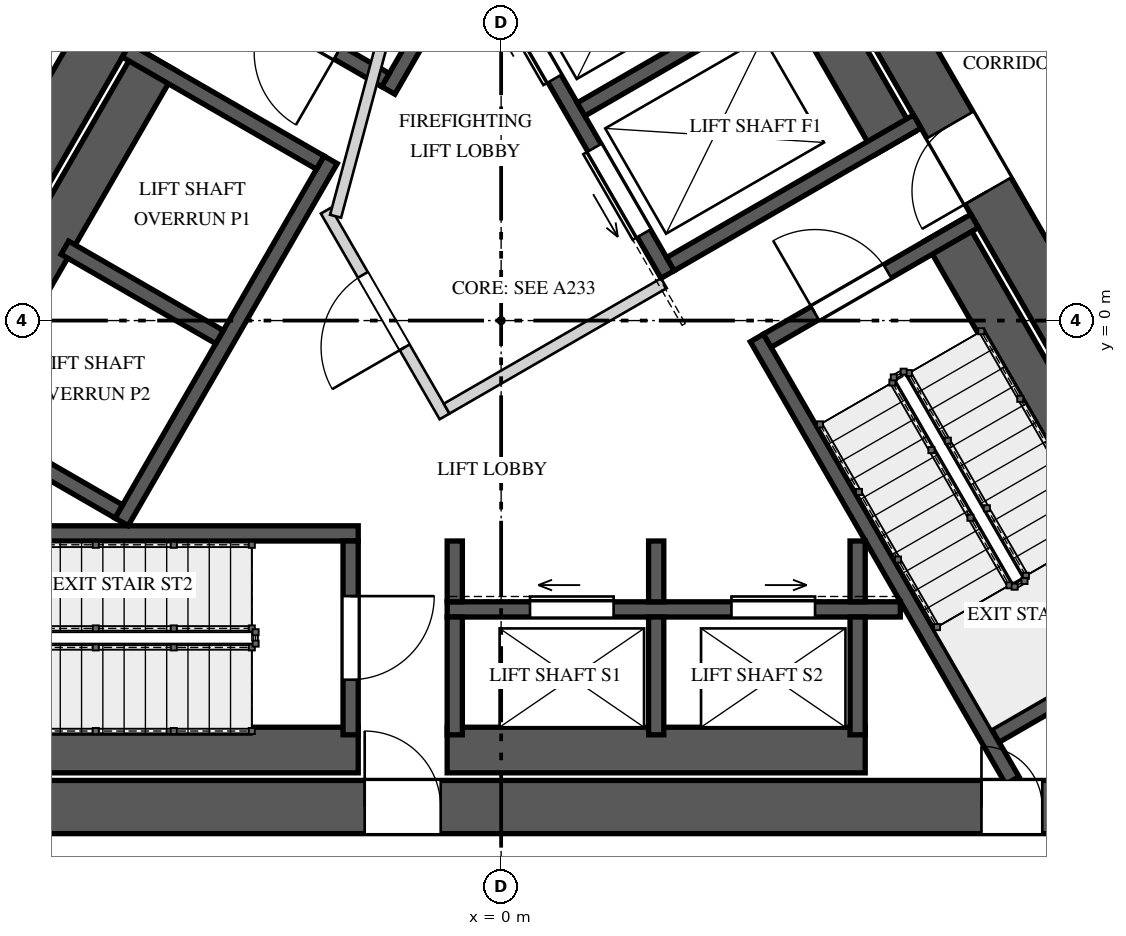
"""IFC4 building model, lengths in metres.
Left out: names, types, materials, properties, quantities, classifications, styles, units other than length and angle.
Written with IfcOpenShell. Run it as: python <this file> out.ifc"""

import sys

from ifc_helpers import new_model, si_unit, direction, frame, frame_2d, origin, place, context, subcontext, project, spatial, rectangle, extrude, element, fill, save


model = new_model("IFC4")
c1 = context("Model", 3, precision=1e-05, world=origin(), true_north=direction((0.0, 1.0)))
c2 = subcontext(c1, "Body", "Model", "MODEL_VIEW")
j1 = project(units=[si_unit("LENGTHUNIT", "METRE"), si_unit("PLANEANGLEUNIT", "RADIAN")], contexts=[c1])
p1 = place(None, origin())
s1 = spatial("IfcSite", under=j1, at=p1, CompositionType="ELEMENT")
p2 = place(p1, origin())
s2 = spatial("IfcBuilding", under=s1, at=p2, CompositionType="ELEMENT")
p3 = place(p2, frame((0.0, 0.0, 241.2)))
s3 = spatial("IfcBuildingStorey", under=s2, at=p3, CompositionType="ELEMENT", Elevation=241.2)
p4 = place(p3, frame((-1.241, 10.65, 0.0), z_axis=(0.0, 0.0, 1.0), x_axis=(-0.500003331888, -0.866023480109, 0.0)))
e1 = element("IfcWall", 1, at=p4, inside=s3, PredefinedType="SHEAR", context=c2, shape_type="SweptSolid", body=[
    extrude(rectangle(XDim=17.205, YDim=0.7, at=frame_2d((8.603, 0.0))), origin(), (0.0, 0.0, 1.0), 4.0),
])
p5 = place(p4, frame((6.808, 0.0, 0.0)))
e2 = element("IfcOpeningElement", 2, at=p5, cuts=e1, PredefinedType="OPENING", context=c2, shape_type="SweptSolid", body=[
    extrude(rectangle(XDim=1.0, YDim=2.4, at=frame_2d((0.5, 1.2))), frame((0.0, 0.36, 0.0), z_axis=(0.0, -1.0, 0.0), x_axis=(1.0, 0.0, 0.0)), (0.0, 0.0, 1.0), 0.72),
])
p6 = place(p4, frame((14.922, 0.0, 0.0)))
e3 = element("IfcOpeningElement", 3, at=p6, cuts=e1, PredefinedType="OPENING", context=c2, shape_type="SweptSolid", body=[
    extrude(rectangle(XDim=0.8, YDim=2.1, at=frame_2d((0.4, 1.05))), frame((0.0, 0.36, 0.0), z_axis=(0.0, -1.0, 0.0), x_axis=(1.0, 0.0, 0.0)), (0.0, 0.0, 1.0), 0.72),
])
p7 = place(p3, frame((-8.603, -6.4, 0.0), z_axis=(0.0, 0.0, 1.0), x_axis=(1.0, 0.0, 0.0)))
e4 = element("IfcWall", 4, at=p7, inside=s3, PredefinedType="SHEAR", context=c2, shape_type="SweptSolid", body=[
    extrude(rectangle(XDim=17.205, YDim=0.7, at=frame_2d((8.603, 0.0))), origin(), (0.0, 0.0, 1.0), 4.0),
])
p8 = place(p7, frame((6.808, 0.0, 0.0)))
e5 = element("IfcOpeningElement", 5, at=p8, cuts=e4, PredefinedType="OPENING", context=c2, shape_type="SweptSolid", body=[
    extrude(rectangle(XDim=1.0, YDim=2.4, at=frame_2d((0.5, 1.2))), frame((0.0, 0.36, 0.0), z_axis=(0.0, -1.0, 0.0), x_axis=(1.0, 0.0, 0.0)), (0.0, 0.0, 1.0), 0.72),
])
p9 = place(p7, frame((14.922, 0.0, 0.0)))
e6 = element("IfcOpeningElement", 6, at=p9, cuts=e4, PredefinedType="OPENING", context=c2, shape_type="SweptSolid", body=[
    extrude(rectangle(XDim=0.8, YDim=2.1, at=frame_2d((0.4, 1.05))), frame((0.0, 0.36, 0.0), z_axis=(0.0, -1.0, 0.0), x_axis=(1.0, 0.0, 0.0)), (0.0, 0.0, 1.0), 0.72),
])
p10 = place(p3, frame((9.844, -4.25, 0.0), z_axis=(0.0, 0.0, 1.0), x_axis=(-0.500003331888, 0.866023480109, 0.0)))
e7 = element("IfcWall", 7, at=p10, inside=s3, PredefinedType="SHEAR", context=c2, shape_type="SweptSolid", body=[
    extrude(rectangle(XDim=17.205, YDim=0.7, at=frame_2d((8.603, 0.0))), origin(), (0.0, 0.0, 1.0), 4.0),
])
p11 = place(p10, frame((6.877, 0.0, 0.0)))
e8 = element("IfcOpeningElement", 8, at=p11, cuts=e7, PredefinedType="OPENING", context=c2, shape_type="SweptSolid", body=[
    extrude(rectangle(XDim=1.0, YDim=2.4, at=frame_2d((0.5, 1.2))), frame((0.0, 0.36, 0.0), z_axis=(0.0, -1.0, 0.0), x_axis=(1.0, 0.0, 0.0)), (0.0, 0.0, 1.0), 0.72),
])
p12 = place(p3, frame((1.876, 8.85, 0.0), z_axis=(0.0, 0.0, 1.0), x_axis=(-0.499998042495, -0.866026533947, 0.0)))
e9 = element("IfcWall", 9, at=p12, inside=s3, PredefinedType="SOLIDWALL", context=c2, shape_type="SweptSolid", body=[
    extrude(rectangle(XDim=6.723, YDim=0.2, at=frame_2d((3.361, 0.0))), origin(), (0.0, 0.0, 1.0), 3.65),
])
p13 = place(p3, frame((-1.521, 3.165, 0.0), z_axis=(0.0, 0.0, 1.0), x_axis=(-0.866035871367, 0.499981869177, 0.0)))
e10 = element("IfcWall", 10, at=p13, inside=s3, PredefinedType="SOLIDWALL", context=c2, shape_type="SweptSolid", body=[
    extrude(rectangle(XDim=3.15, YDim=0.2, at=frame_2d((1.575, 0.0))), origin(), (0.0, 0.0, 1.0), 3.65),
])
p14 = place(p13, frame((0.725, 0.0, 0.0)))
e11 = element("IfcOpeningElement", 11, at=p14, cuts=e10, PredefinedType="OPENING", context=c2, shape_type="SweptSolid", body=[
    extrude(rectangle(XDim=1.1, YDim=2.4, at=frame_2d((0.55, 1.2))), frame((0.0, 0.11, 0.0), z_axis=(0.0, -1.0, 0.0), x_axis=(1.0, 0.0, 0.0)), (0.0, 0.0, 1.0), 0.22),
])
p15 = place(p3, frame((-8.08, -5.65, 0.0), z_axis=(0.0, 0.0, 1.0), x_axis=(1.0, 0.0, 0.0)))
e12 = element("IfcWall", 12, at=p15, inside=s3, PredefinedType="SOLIDWALL", context=c2, shape_type="SweptSolid", body=[
    extrude(rectangle(XDim=6.2, YDim=0.6, at=frame_2d((3.1, 0.0))), origin(), (0.0, 0.0, 1.0), 3.65),
])
p16 = place(p3, frame((-8.603, -2.8, 0.0), z_axis=(0.0, 0.0, 1.0), x_axis=(1.0, 0.0, 0.0)))
e13 = element("IfcWall", 13, at=p16, inside=s3, PredefinedType="SOLIDWALL", context=c2, shape_type="SweptSolid", body=[
    extrude(rectangle(XDim=6.723, YDim=0.2, at=frame_2d((3.361, 0.0))), origin(), (0.0, 0.0, 1.0), 3.65),
])
p17 = place(p3, frame((-1.98, -2.9, 0.0), z_axis=(0.0, 0.0, 1.0), x_axis=(0.0, -1.0, 0.0)))
e14 = element("IfcWall", 14, at=p17, inside=s3, PredefinedType="SOLIDWALL", context=c2, shape_type="SweptSolid", body=[
    extrude(rectangle(XDim=2.55, YDim=0.2, at=frame_2d((1.275, 0.0))), origin(), (0.0, 0.0, 1.0), 3.65),
])
p18 = place(p17, frame((0.725, 0.0, 0.0)))
e15 = element("IfcOpeningElement", 15, at=p18, cuts=e14, PredefinedType="OPENING", context=c2, shape_type="SweptSolid", body=[
    extrude(rectangle(XDim=1.1, YDim=2.4, at=frame_2d((0.55, 1.2))), frame((0.0, 0.11, 0.0), z_axis=(0.0, -1.0, 0.0), x_axis=(1.0, 0.0, 0.0)), (0.0, 0.0, 1.0), 0.22),
])
p19 = place(p3, frame((8.933, -4.172, 0.0), z_axis=(0.0, 0.0, 1.0), x_axis=(-0.500026960575, 0.86600983753, 0.0)))
e16 = element("IfcWall", 16, at=p19, inside=s3, PredefinedType="SOLIDWALL", context=c2, shape_type="SweptSolid", body=[
    extrude(rectangle(XDim=6.2, YDim=0.6, at=frame_2d((3.1, 0.0))), origin(), (0.0, 0.0, 1.0), 3.65),
])
p20 = place(p3, frame((6.726, -6.05, 0.0), z_axis=(0.0, 0.0, 1.0), x_axis=(-0.499970804718, 0.866042259032, 0.0)))
e17 = element("IfcWall", 17, at=p20, inside=s3, PredefinedType="SOLIDWALL", context=c2, shape_type="SweptSolid", body=[
    extrude(rectangle(XDim=6.723, YDim=0.2, at=frame_2d((3.361, 0.0))), origin(), (0.0, 0.0, 1.0), 3.65),
])
p21 = place(p3, frame((6.501, -5.461, 0.0), z_axis=(0.0, 0.0, 1.0), x_axis=(0.866035871367, 0.499981869177, 0.0)))
e18 = element("IfcWall", 18, at=p21, inside=s3, PredefinedType="SOLIDWALL", context=c2, shape_type="SweptSolid", body=[
    extrude(rectangle(XDim=3.15, YDim=0.2, at=frame_2d((1.575, 0.0))), origin(), (0.0, 0.0, 1.0), 3.65),
])
p22 = place(p3, frame((3.501, -0.265, 0.0), z_axis=(0.0, 0.0, 1.0), x_axis=(0.866035871367, 0.499981869177, 0.0)))
e19 = element("IfcWall", 19, at=p22, inside=s3, PredefinedType="SOLIDWALL", context=c2, shape_type="SweptSolid", body=[
    extrude(rectangle(XDim=3.15, YDim=0.2, at=frame_2d((1.575, 0.0))), origin(), (0.0, 0.0, 1.0), 3.65),
])
p23 = place(p22, frame((0.725, 0.0, 0.0)))
e20 = element("IfcOpeningElement", 20, at=p23, cuts=e19, PredefinedType="OPENING", context=c2, shape_type="SweptSolid", body=[
    extrude(rectangle(XDim=1.1, YDim=2.4, at=frame_2d((0.55, 1.2))), frame((0.0, 0.11, 0.0), z_axis=(0.0, -1.0, 0.0), x_axis=(1.0, 0.0, 0.0)), (0.0, 0.0, 1.0), 0.22),
])
p24 = place(p3, frame((-2.243, 2.115, 0.0), z_axis=(0.0, 0.0, 1.0), x_axis=(-0.499996545922, -0.866027397988, 0.0)))
e21 = element("IfcWall", 21, at=p24, inside=s3, PredefinedType="SOLIDWALL", context=c2, shape_type="SweptSolid", body=[
    extrude(rectangle(XDim=5.5, YDim=0.2, at=frame_2d((2.75, 0.0))), origin(), (0.0, 0.0, 1.0), 3.65),
])
p25 = place(p3, frame((-4.538, 3.44, 0.0), z_axis=(0.0, 0.0, 1.0), x_axis=(-0.499996545922, -0.866027397988, 0.0)))
e22 = element("IfcWall", 22, at=p25, inside=s3, PredefinedType="SOLIDWALL", context=c2, shape_type="SweptSolid", body=[
    extrude(rectangle(XDim=5.5, YDim=0.6, at=frame_2d((2.75, 0.0))), origin(), (0.0, 0.0, 1.0), 3.65),
])
p26 = place(p3, frame((-2.38, 2.078, 0.0), z_axis=(0.0, 0.0, 1.0), x_axis=(-0.866060182126, 0.499939757307, 0.0)))
e23 = element("IfcWall", 23, at=p26, inside=s3, PredefinedType="SOLIDWALL", context=c2, shape_type="SweptSolid", body=[
    extrude(rectangle(XDim=2.95, YDim=0.2, at=frame_2d((1.475, 0.0))), origin(), (0.0, 0.0, 1.0), 3.65),
])
p27 = place(p3, frame((-3.705, -0.217, 0.0), z_axis=(0.0, 0.0, 1.0), x_axis=(-0.866016039709, 0.500016218704, 0.0)))
e24 = element("IfcWall", 24, at=p27, inside=s3, PredefinedType="SOLIDWALL", context=c2, shape_type="SweptSolid", body=[
    extrude(rectangle(XDim=2.35, YDim=0.2, at=frame_2d((1.175, 0.0))), origin(), (0.0, 0.0, 1.0), 3.65),
])
p28 = place(p3, frame((-5.03, -2.512, 0.0), z_axis=(0.0, 0.0, 1.0), x_axis=(-0.866003658127, 0.500037662692, 0.0)))
e25 = element("IfcWall", 25, at=p28, inside=s3, PredefinedType="SOLIDWALL", context=c2, shape_type="SweptSolid", body=[
    extrude(rectangle(XDim=2.95, YDim=0.2, at=frame_2d((1.475, 0.0))), origin(), (0.0, 0.0, 1.0), 3.65),
])
p29 = place(p3, frame((-0.71, -3.8, 0.0), z_axis=(0.0, 0.0, 1.0), x_axis=(1.0, 0.0, 0.0)))
e26 = element("IfcWall", 26, at=p29, inside=s3, PredefinedType="SOLIDWALL", context=c2, shape_type="SweptSolid", body=[
    extrude(rectangle(XDim=5.961, YDim=0.2, at=frame_2d((2.981, 0.0))), origin(), (0.0, 0.0, 1.0), 3.65),
])
p30 = place(p29, frame((1.09, 0.0, 0.0)))
e27 = element("IfcOpeningElement", 27, at=p30, cuts=e26, PredefinedType="OPENING", context=c2, shape_type="SweptSolid", body=[
    extrude(rectangle(XDim=1.1, YDim=2.1, at=frame_2d((0.55, 1.05))), frame((0.0, 0.11, 0.0), z_axis=(0.0, -1.0, 0.0), x_axis=(1.0, 0.0, 0.0)), (0.0, 0.0, 1.0), 0.22),
])
p31 = place(p29, frame((3.74, 0.0, 0.0)))
e28 = element("IfcOpeningElement", 28, at=p31, cuts=e26, PredefinedType="OPENING", context=c2, shape_type="SweptSolid", body=[
    extrude(rectangle(XDim=1.1, YDim=2.1, at=frame_2d((0.55, 1.05))), frame((0.0, 0.11, 0.0), z_axis=(0.0, -1.0, 0.0), x_axis=(1.0, 0.0, 0.0)), (0.0, 0.0, 1.0), 0.22),
])
p32 = place(p3, frame((-0.71, -5.65, 0.0), z_axis=(0.0, 0.0, 1.0), x_axis=(1.0, 0.0, 0.0)))
e29 = element("IfcWall", 29, at=p32, inside=s3, PredefinedType="SOLIDWALL", context=c2, shape_type="SweptSolid", body=[
    extrude(rectangle(XDim=5.5, YDim=0.6, at=frame_2d((2.75, 0.0))), origin(), (0.0, 0.0, 1.0), 3.65),
])
p33 = place(p3, frame((-0.61, -3.9, 0.0), z_axis=(0.0, 0.0, 1.0), x_axis=(0.0, -1.0, 0.0)))
e30 = element("IfcWall", 30, at=p33, inside=s3, PredefinedType="SOLIDWALL", context=c2, shape_type="SweptSolid", body=[
    extrude(rectangle(XDim=1.55, YDim=0.2, at=frame_2d((0.775, 0.0))), origin(), (0.0, 0.0, 1.0), 3.65),
])
p34 = place(p3, frame((-0.61, -2.9, 0.0), z_axis=(0.0, 0.0, 1.0), x_axis=(0.0, -1.0, 0.0)))
e31 = element("IfcWall", 31, at=p34, inside=s3, PredefinedType="SOLIDWALL", context=c2, shape_type="SweptSolid", body=[
    extrude(rectangle(XDim=0.8, YDim=0.2, at=frame_2d((0.4, 0.0))), origin(), (0.0, 0.0, 1.0), 3.65),
])
p35 = place(p3, frame((2.04, -3.9, 0.0), z_axis=(0.0, 0.0, 1.0), x_axis=(0.0, -1.0, 0.0)))
e32 = element("IfcWall", 32, at=p35, inside=s3, PredefinedType="SOLIDWALL", context=c2, shape_type="SweptSolid", body=[
    extrude(rectangle(XDim=1.55, YDim=0.2, at=frame_2d((0.775, 0.0))), origin(), (0.0, 0.0, 1.0), 3.65),
])
p36 = place(p3, frame((2.04, -2.9, 0.0), z_axis=(0.0, 0.0, 1.0), x_axis=(0.0, -1.0, 0.0)))
e33 = element("IfcWall", 33, at=p36, inside=s3, PredefinedType="SOLIDWALL", context=c2, shape_type="SweptSolid", body=[
    extrude(rectangle(XDim=0.8, YDim=0.2, at=frame_2d((0.4, 0.0))), origin(), (0.0, 0.0, 1.0), 3.65),
])
p37 = place(p3, frame((4.69, -3.9, 0.0), z_axis=(0.0, 0.0, 1.0), x_axis=(0.0, -1.0, 0.0)))
e34 = element("IfcWall", 34, at=p37, inside=s3, PredefinedType="SOLIDWALL", context=c2, shape_type="SweptSolid", body=[
    extrude(rectangle(XDim=1.55, YDim=0.2, at=frame_2d((0.775, 0.0))), origin(), (0.0, 0.0, 1.0), 3.65),
])
p38 = place(p3, frame((4.69, -2.9, 0.0), z_axis=(0.0, 0.0, 1.0), x_axis=(0.0, -1.0, 0.0)))
e35 = element("IfcWall", 35, at=p38, inside=s3, PredefinedType="SOLIDWALL", context=c2, shape_type="SweptSolid", body=[
    extrude(rectangle(XDim=0.8, YDim=0.2, at=frame_2d((0.4, 0.0))), origin(), (0.0, 0.0, 1.0), 3.65),
])
p39 = place(p3, frame((2.19, 0.606, 0.0), z_axis=(0.0, 0.0, 1.0), x_axis=(-0.500002801628, 0.866023786258, 0.0)))
e36 = element("IfcWall", 36, at=p39, inside=s3, PredefinedType="SOLIDWALL", context=c2, shape_type="SweptSolid", body=[
    extrude(rectangle(XDim=4.9, YDim=0.2, at=frame_2d((2.45, 0.0))), origin(), (0.0, 0.0, 1.0), 3.65),
])
p40 = place(p39, frame((0.625, 0.0, 0.0)))
e37 = element("IfcOpeningElement", 37, at=p40, cuts=e36, PredefinedType="OPENING", context=c2, shape_type="SweptSolid", body=[
    extrude(rectangle(XDim=1.3, YDim=2.1, at=frame_2d((0.65, 1.05))), frame((0.0, 0.11, 0.0), z_axis=(0.0, -1.0, 0.0), x_axis=(1.0, 0.0, 0.0)), (0.0, 0.0, 1.0), 0.22),
])
p41 = place(p39, frame((2.975, 0.0, 0.0)))
e38 = element("IfcOpeningElement", 38, at=p41, cuts=e36, PredefinedType="OPENING", context=c2, shape_type="SweptSolid", body=[
    extrude(rectangle(XDim=1.3, YDim=2.1, at=frame_2d((0.65, 1.05))), frame((0.0, 0.11, 0.0), z_axis=(0.0, -1.0, 0.0), x_axis=(1.0, 0.0, 0.0)), (0.0, 0.0, 1.0), 0.22),
])
p42 = place(p3, frame((5.178, 2.331, 0.0), z_axis=(0.0, 0.0, 1.0), x_axis=(-0.49998122708, 0.866036242063, 0.0)))
e39 = element("IfcWall", 39, at=p42, inside=s3, PredefinedType="SOLIDWALL", context=c2, shape_type="SweptSolid", body=[
    extrude(rectangle(XDim=4.9, YDim=0.6, at=frame_2d((2.45, 0.0))), origin(), (0.0, 0.0, 1.0), 3.65),
])
p43 = place(p3, frame((2.227, 0.743, 0.0), z_axis=(0.0, 0.0, 1.0), x_axis=(0.866022959057, 0.500004234368, 0.0)))
e40 = element("IfcWall", 40, at=p43, inside=s3, PredefinedType="SOLIDWALL", context=c2, shape_type="SweptSolid", body=[
    extrude(rectangle(XDim=3.75, YDim=0.2, at=frame_2d((1.875, 0.0))), origin(), (0.0, 0.0, 1.0), 3.65),
])
p44 = place(p3, frame((1.052, 2.778, 0.0), z_axis=(0.0, 0.0, 1.0), x_axis=(0.866039234136, 0.499976044363, 0.0)))
e41 = element("IfcWall", 41, at=p44, inside=s3, PredefinedType="SOLIDWALL", context=c2, shape_type="SweptSolid", body=[
    extrude(rectangle(XDim=3.75, YDim=0.2, at=frame_2d((1.875, 0.0))), origin(), (0.0, 0.0, 1.0), 3.65),
])
p45 = place(p3, frame((-0.744, -1.261, 0.0), z_axis=(0.0, 0.0, 1.0), x_axis=(-0.500004234368, 0.866022959057, 0.0)))
e42 = element("IfcWall", 42, at=p45, inside=s3, PredefinedType="PARTITIONING", context=c2, shape_type="SweptSolid", body=[
    extrude(rectangle(XDim=3.125, YDim=0.15, at=frame_2d((1.562, 0.0))), origin(), (0.0, 0.0, 1.0), 3.65),
])
p46 = place(p45, frame((1.05, 0.0, 0.0)))
e43 = element("IfcOpeningElement", 43, at=p46, cuts=e42, PredefinedType="OPENING", context=c2, shape_type="SweptSolid", body=[
    extrude(rectangle(XDim=1.1, YDim=2.4, at=frame_2d((0.55, 1.2))), frame((0.0, 0.085, 0.0), z_axis=(0.0, -1.0, 0.0), x_axis=(1.0, 0.0, 0.0)), (0.0, 0.0, 1.0), 0.17),
])
p47 = place(p3, frame((-0.717, -1.159, 0.0), z_axis=(0.0, 0.0, 1.0), x_axis=(0.866008176907, 0.50002983664, 0.0)))
e44 = element("IfcWall", 44, at=p47, inside=s3, PredefinedType="PARTITIONING", context=c2, shape_type="SweptSolid", body=[
    extrude(rectangle(XDim=3.3, YDim=0.15, at=frame_2d((1.65, 0.0))), origin(), (0.0, 0.0, 1.0), 3.65),
])
p48 = place(p3, frame((-2.178, 1.372, 0.0), z_axis=(0.0, 0.0, 1.0), x_axis=(0.258808958833, 0.96592852884, 0.0)))
e45 = element("IfcWall", 45, at=p48, inside=s3, PredefinedType="PARTITIONING", context=c2, shape_type="SweptSolid", body=[
    extrude(rectangle(XDim=2.903, YDim=0.15, at=frame_2d((1.451, 0.0))), origin(), (0.0, 0.0, 1.0), 3.65),
])
p49 = place(p14, origin())
e46 = element("IfcDoor", 46, at=p49, inside=s3, OperationType="SINGLE_SWING_RIGHT", PredefinedType="DOOR", context=c2, shape_type="SweptSolid", body=[
    extrude(rectangle(XDim=1.1, YDim=2.4, at=frame_2d((0.55, 1.2))), frame((0.0, 0.025, 0.0), z_axis=(0.0, -1.0, 0.0), x_axis=(1.0, 0.0, 0.0)), (0.0, 0.0, 1.0), 0.05),
])
fill(e11, e46)
p50 = place(p18, origin())
e47 = element("IfcDoor", 47, at=p50, inside=s3, OperationType="SINGLE_SWING_LEFT", PredefinedType="DOOR", context=c2, shape_type="SweptSolid", body=[
    extrude(rectangle(XDim=1.1, YDim=2.4, at=frame_2d((0.55, 1.2))), frame((0.0, 0.025, 0.0), z_axis=(0.0, -1.0, 0.0), x_axis=(1.0, 0.0, 0.0)), (0.0, 0.0, 1.0), 0.05),
])
fill(e15, e47)
p51 = place(p23, origin())
e48 = element("IfcDoor", 48, at=p51, inside=s3, OperationType="SINGLE_SWING_RIGHT", PredefinedType="DOOR", context=c2, shape_type="SweptSolid", body=[
    extrude(rectangle(XDim=1.1, YDim=2.4, at=frame_2d((0.55, 1.2))), frame((0.0, 0.025, 0.0), z_axis=(0.0, -1.0, 0.0), x_axis=(1.0, 0.0, 0.0)), (0.0, 0.0, 1.0), 0.05),
])
fill(e20, e48)
p52 = place(p30, origin())
e49 = element("IfcDoor", 49, at=p52, inside=s3, OperationType="SLIDING_TO_LEFT", PredefinedType="DOOR", context=c2, shape_type="SweptSolid", body=[
    extrude(rectangle(XDim=1.1, YDim=2.1, at=frame_2d((0.55, 1.05))), frame((0.0, 0.025, 0.0), z_axis=(0.0, -1.0, 0.0), x_axis=(1.0, 0.0, 0.0)), (0.0, 0.0, 1.0), 0.05),
])
fill(e27, e49)
p53 = place(p31, origin())
e50 = element("IfcDoor", 50, at=p53, inside=s3, OperationType="SLIDING_TO_RIGHT", PredefinedType="DOOR", context=c2, shape_type="SweptSolid", body=[
    extrude(rectangle(XDim=1.1, YDim=2.1, at=frame_2d((0.55, 1.05))), frame((0.0, 0.025, 0.0), z_axis=(0.0, -1.0, 0.0), x_axis=(1.0, 0.0, 0.0)), (0.0, 0.0, 1.0), 0.05),
])
fill(e28, e50)
p54 = place(p40, origin())
e51 = element("IfcDoor", 51, at=p54, inside=s3, OperationType="SLIDING_TO_LEFT", PredefinedType="DOOR", context=c2, shape_type="SweptSolid", body=[
    extrude(rectangle(XDim=1.3, YDim=2.1, at=frame_2d((0.65, 1.05))), frame((0.0, 0.025, 0.0), z_axis=(0.0, -1.0, 0.0), x_axis=(1.0, 0.0, 0.0)), (0.0, 0.0, 1.0), 0.05),
])
fill(e37, e51)
p55 = place(p41, origin())
e52 = element("IfcDoor", 52, at=p55, inside=s3, OperationType="SLIDING_TO_RIGHT", PredefinedType="DOOR", context=c2, shape_type="SweptSolid", body=[
    extrude(rectangle(XDim=1.3, YDim=2.1, at=frame_2d((0.65, 1.05))), frame((0.0, 0.025, 0.0), z_axis=(0.0, -1.0, 0.0), x_axis=(1.0, 0.0, 0.0)), (0.0, 0.0, 1.0), 0.05),
])
fill(e38, e52)
p56 = place(p46, origin())
e53 = element("IfcDoor", 53, at=p56, inside=s3, OperationType="SINGLE_SWING_LEFT", PredefinedType="DOOR", context=c2, shape_type="SweptSolid", body=[
    extrude(rectangle(XDim=1.1, YDim=2.4, at=frame_2d((0.55, 1.2))), frame((0.0, 0.025, 0.0), z_axis=(0.0, -1.0, 0.0), x_axis=(1.0, 0.0, 0.0)), (0.0, 0.0, 1.0), 0.05),
])
fill(e43, e53)
p57 = place(p8, origin())
e54 = element("IfcDoor", 54, at=p57, inside=s3, OperationType="SINGLE_SWING_LEFT", PredefinedType="DOOR", context=c2, shape_type="SweptSolid", body=[
    extrude(rectangle(XDim=1.0, YDim=2.4, at=frame_2d((0.5, 1.2))), frame((0.0, 0.025, 0.0), z_axis=(0.0, -1.0, 0.0), x_axis=(1.0, 0.0, 0.0)), (0.0, 0.0, 1.0), 0.05),
])
fill(e5, e54)
p58 = place(p11, origin())
e55 = element("IfcDoor", 55, at=p58, inside=s3, OperationType="SINGLE_SWING_RIGHT", PredefinedType="DOOR", context=c2, shape_type="SweptSolid", body=[
    extrude(rectangle(XDim=1.0, YDim=2.4, at=frame_2d((0.5, 1.2))), frame((0.0, 0.025, 0.0), z_axis=(0.0, -1.0, 0.0), x_axis=(1.0, 0.0, 0.0)), (0.0, 0.0, 1.0), 0.05),
])
fill(e8, e55)
p59 = place(p9, origin())
e56 = element("IfcDoor", 56, at=p59, inside=s3, OperationType="SINGLE_SWING_RIGHT", PredefinedType="DOOR", context=c2, shape_type="SweptSolid", body=[
    extrude(rectangle(XDim=0.8, YDim=2.1, at=frame_2d((0.4, 1.05))), frame((0.0, 0.025, 0.0), z_axis=(0.0, -1.0, 0.0), x_axis=(1.0, 0.0, 0.0)), (0.0, 0.0, 1.0), 0.05),
])
fill(e6, e56)
save(model, sys.argv[1])
